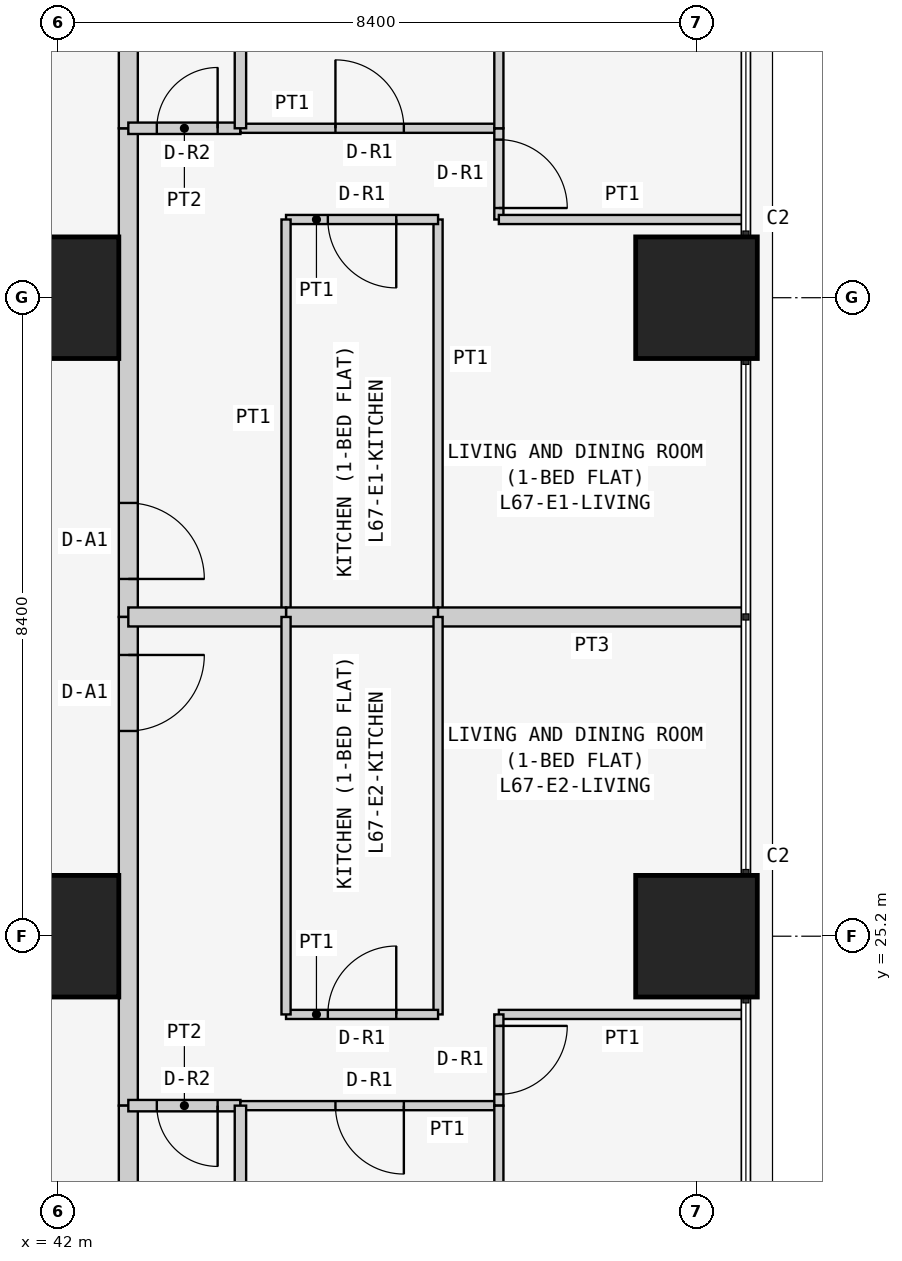
"""IFC4 building model, lengths in metres.
Left out: names, types, materials, properties, quantities, classifications, styles, units other than length and angle.
Written with IfcOpenShell. Run it as: python <this file> out.ifc"""

import sys

from ifc_helpers import new_model, si_unit, direction, frame, frame_2d, origin, origin_2d, place, context, subcontext, project, spatial, rectangle, extrude, element, fill, save


model = new_model("IFC4")
c1 = context("Model", 3, precision=1e-05, world=origin(), true_north=direction((0.0, 1.0)))
c2 = subcontext(c1, "Body", "Model", "MODEL_VIEW")
j1 = project(units=[si_unit("LENGTHUNIT", "METRE"), si_unit("PLANEANGLEUNIT", "RADIAN")], contexts=[c1])
p1 = place(None, origin())
s1 = spatial("IfcSite", under=j1, at=p1, CompositionType="ELEMENT")
p2 = place(p1, origin())
s2 = spatial("IfcBuilding", under=s1, at=p2, CompositionType="ELEMENT")
p3 = place(p2, frame((0.0, 0.0, 257.7)))
s3 = spatial("IfcBuildingStorey", under=s2, at=p3, CompositionType="ELEMENT", Elevation=257.7)
for number, where, z_axis, x_axis in (
    (1, (42.0, 25.2, 0.0), (0.0, 0.0, 1.0), (1.0, 0.0, 0.0)),
    (2, (42.0, 33.6, 0.0), (0.0, 0.0, 1.0), (1.0, 0.0, 0.0)),
    (3, (50.4, 25.2, 0.0), (0.0, 0.0, 1.0), (1.0, 0.0, 0.0)),
    (4, (50.4, 33.6, 0.0), (0.0, 0.0, 1.0), (1.0, 0.0, 0.0)),
):
    element("IfcColumn", number, at=place(p3, frame(where, z_axis=z_axis, x_axis=x_axis)), inside=s3, PredefinedType="COLUMN", context=c2, shape_type="SweptSolid", body=[
        extrude(rectangle(XDim=1.6, YDim=1.6, at=origin_2d()), origin(), (0.0, 0.0, 1.0), 3.6),
    ])
p4 = place(p3, frame((42.925, 35.829, 0.0), z_axis=(0.0, 0.0, 1.0), x_axis=(0.0, -1.0, 0.0)))
e5 = element("IfcWall", 5, at=p4, inside=s3, PredefinedType="PARTITIONING", context=c2, shape_type="SweptSolid", body=[
    extrude(rectangle(XDim=6.429, YDim=0.25, at=frame_2d((3.215, 0.0))), origin(), (0.0, 0.0, 1.0), 3.45),
])
p5 = place(p4, frame((4.929, 0.0, 0.0)))
e6 = element("IfcOpeningElement", 6, at=p5, cuts=e5, PredefinedType="OPENING", context=c2, shape_type="SweptSolid", body=[
    extrude(rectangle(XDim=1.0, YDim=2.1, at=frame_2d((0.5, 1.05))), frame((0.0, 0.135, 0.0), z_axis=(0.0, -1.0, 0.0), x_axis=(1.0, 0.0, 0.0)), (0.0, 0.0, 1.0), 0.27),
])
p6 = place(p3, frame((42.925, 42.7, 0.0), z_axis=(0.0, 0.0, 1.0), x_axis=(0.0, -1.0, 0.0)))
e7 = element("IfcWall", 7, at=p6, inside=s3, PredefinedType="PARTITIONING", context=c2, shape_type="SweptSolid", body=[
    extrude(rectangle(XDim=6.871, YDim=0.25, at=frame_2d((3.436, 0.0))), origin(), (0.0, 0.0, 1.0), 3.45),
])
p7 = place(p3, frame((42.925, 29.4, 0.0), z_axis=(0.0, 0.0, 1.0), x_axis=(0.0, -1.0, 0.0)))
e8 = element("IfcWall", 8, at=p7, inside=s3, PredefinedType="PARTITIONING", context=c2, shape_type="SweptSolid", body=[
    extrude(rectangle(XDim=6.429, YDim=0.25, at=frame_2d((3.214, 0.0))), origin(), (0.0, 0.0, 1.0), 3.45),
])
p8 = place(p7, frame((0.5, 0.0, 0.0)))
e9 = element("IfcOpeningElement", 9, at=p8, cuts=e8, PredefinedType="OPENING", context=c2, shape_type="SweptSolid", body=[
    extrude(rectangle(XDim=1.0, YDim=2.1, at=frame_2d((0.5, 1.05))), frame((0.0, 0.135, 0.0), z_axis=(0.0, -1.0, 0.0), x_axis=(1.0, 0.0, 0.0)), (0.0, 0.0, 1.0), 0.27),
])
p9 = place(p3, frame((42.925, 22.971, 0.0), z_axis=(0.0, 0.0, 1.0), x_axis=(0.0, -1.0, 0.0)))
e10 = element("IfcWall", 10, at=p9, inside=s3, PredefinedType="PARTITIONING", context=c2, shape_type="SweptSolid", body=[
    extrude(rectangle(XDim=6.871, YDim=0.25, at=frame_2d((3.436, 0.0))), origin(), (0.0, 0.0, 1.0), 3.45),
])
p10 = place(p3, frame((47.0, 29.4, 0.0), z_axis=(0.0, 0.0, 1.0), x_axis=(0.0, 1.0, 0.0)))
e11 = element("IfcWall", 11, at=p10, inside=s3, PredefinedType="PARTITIONING", context=c2, shape_type="SweptSolid", body=[
    extrude(rectangle(XDim=5.229, YDim=0.12, at=frame_2d((2.615, 0.0))), origin(), (0.0, 0.0, 1.0), 3.45),
])
p11 = place(p3, frame((47.0, 34.629, 0.0), z_axis=(0.0, 0.0, 1.0), x_axis=(-1.0, 0.0, 0.0)))
e12 = element("IfcWall", 12, at=p11, inside=s3, PredefinedType="PARTITIONING", context=c2, shape_type="SweptSolid", body=[
    extrude(rectangle(XDim=2.0, YDim=0.12, at=frame_2d((1.0, 0.0))), origin(), (0.0, 0.0, 1.0), 3.45),
])
p12 = place(p11, frame((0.55, 0.0, 0.0)))
e13 = element("IfcOpeningElement", 13, at=p12, cuts=e12, PredefinedType="OPENING", context=c2, shape_type="SweptSolid", body=[
    extrude(rectangle(XDim=0.9, YDim=2.1, at=frame_2d((0.45, 1.05))), frame((0.0, 0.07, 0.0), z_axis=(0.0, -1.0, 0.0), x_axis=(1.0, 0.0, 0.0)), (0.0, 0.0, 1.0), 0.14),
])
p13 = place(p3, frame((45.0, 34.629, 0.0), z_axis=(0.0, 0.0, 1.0), x_axis=(0.0, -1.0, 0.0)))
e14 = element("IfcWall", 14, at=p13, inside=s3, PredefinedType="PARTITIONING", context=c2, shape_type="SweptSolid", body=[
    extrude(rectangle(XDim=5.229, YDim=0.12, at=frame_2d((2.615, 0.0))), origin(), (0.0, 0.0, 1.0), 3.45),
])
p14 = place(p3, frame((45.0, 29.4, 0.0), z_axis=(0.0, 0.0, 1.0), x_axis=(1.0, 0.0, 0.0)))
e15 = element("IfcWall", 15, at=p14, inside=s3, PredefinedType="PARTITIONING", context=c2, shape_type="SweptSolid", body=[
    extrude(rectangle(XDim=2.0, YDim=0.25, at=frame_2d((1.0, 0.0))), origin(), (0.0, 0.0, 1.0), 3.45),
])
p15 = place(p3, frame((42.925, 35.829, 0.0), z_axis=(0.0, 0.0, 1.0), x_axis=(1.0, 0.0, 0.0)))
e16 = element("IfcWall", 16, at=p15, inside=s3, PredefinedType="PARTITIONING", context=c2, shape_type="SweptSolid", body=[
    extrude(rectangle(XDim=1.475, YDim=0.15, at=frame_2d((0.737, 0.0))), origin(), (0.0, 0.0, 1.0), 3.45),
])
p16 = place(p15, frame((0.375, 0.0, 0.0)))
e17 = element("IfcOpeningElement", 17, at=p16, cuts=e16, PredefinedType="OPENING", context=c2, shape_type="SweptSolid", body=[
    extrude(rectangle(XDim=0.8, YDim=2.1, at=frame_2d((0.4, 1.05))), frame((0.0, 0.085, 0.0), z_axis=(0.0, -1.0, 0.0), x_axis=(1.0, 0.0, 0.0)), (0.0, 0.0, 1.0), 0.17),
])
p17 = place(p3, frame((44.4, 35.829, 0.0), z_axis=(0.0, 0.0, 1.0), x_axis=(1.0, 0.0, 0.0)))
e18 = element("IfcWall", 18, at=p17, inside=s3, PredefinedType="PARTITIONING", context=c2, shape_type="SweptSolid", body=[
    extrude(rectangle(XDim=3.4, YDim=0.12, at=frame_2d((1.7, 0.0))), origin(), (0.0, 0.0, 1.0), 3.45),
])
p18 = place(p17, frame((1.25, 0.0, 0.0)))
e19 = element("IfcOpeningElement", 19, at=p18, cuts=e18, PredefinedType="OPENING", context=c2, shape_type="SweptSolid", body=[
    extrude(rectangle(XDim=0.9, YDim=2.1, at=frame_2d((0.45, 1.05))), frame((0.0, 0.07, 0.0), z_axis=(0.0, -1.0, 0.0), x_axis=(1.0, 0.0, 0.0)), (0.0, 0.0, 1.0), 0.14),
])
p19 = place(p3, frame((47.8, 35.829, 0.0), z_axis=(0.0, 0.0, 1.0), x_axis=(0.0, -1.0, 0.0)))
e20 = element("IfcWall", 20, at=p19, inside=s3, PredefinedType="PARTITIONING", context=c2, shape_type="SweptSolid", body=[
    extrude(rectangle(XDim=1.2, YDim=0.12, at=frame_2d((0.6, 0.0))), origin(), (0.0, 0.0, 1.0), 3.45),
])
p20 = place(p19, frame((0.149, 0.0, 0.0)))
e21 = element("IfcOpeningElement", 21, at=p20, cuts=e20, PredefinedType="OPENING", context=c2, shape_type="SweptSolid", body=[
    extrude(rectangle(XDim=0.9, YDim=2.1, at=frame_2d((0.45, 1.05))), frame((0.0, 0.07, 0.0), z_axis=(0.0, -1.0, 0.0), x_axis=(1.0, 0.0, 0.0)), (0.0, 0.0, 1.0), 0.14),
])
p21 = place(p3, frame((47.8, 34.629, 0.0), z_axis=(0.0, 0.0, 1.0), x_axis=(1.0, 0.0, 0.0)))
e22 = element("IfcWall", 22, at=p21, inside=s3, PredefinedType="PARTITIONING", context=c2, shape_type="SweptSolid", body=[
    extrude(rectangle(XDim=3.25, YDim=0.12, at=frame_2d((1.625, 0.0))), origin(), (0.0, 0.0, 1.0), 3.45),
])
p22 = place(p3, frame((45.0, 29.4, 0.0), z_axis=(0.0, 0.0, 1.0), x_axis=(-1.0, 0.0, 0.0)))
e23 = element("IfcWall", 23, at=p22, inside=s3, PredefinedType="PARTITIONING", context=c2, shape_type="SweptSolid", body=[
    extrude(rectangle(XDim=2.075, YDim=0.25, at=frame_2d((1.038, 0.0))), origin(), (0.0, 0.0, 1.0), 3.45),
])
p23 = place(p3, frame((51.05, 29.4, 0.0), z_axis=(0.0, 0.0, 1.0), x_axis=(-1.0, 0.0, 0.0)))
e24 = element("IfcWall", 24, at=p23, inside=s3, PredefinedType="PARTITIONING", context=c2, shape_type="SweptSolid", body=[
    extrude(rectangle(XDim=4.05, YDim=0.25, at=frame_2d((2.025, 0.0))), origin(), (0.0, 0.0, 1.0), 3.45),
])
p24 = place(p3, frame((44.4, 35.829, 0.0), z_axis=(0.0, 0.0, 1.0), x_axis=(0.0, 1.0, 0.0)))
e25 = element("IfcWall", 25, at=p24, inside=s3, PredefinedType="PARTITIONING", context=c2, shape_type="SweptSolid", body=[
    extrude(rectangle(XDim=6.871, YDim=0.15, at=frame_2d((3.436, 0.0))), origin(), (0.0, 0.0, 1.0), 3.45),
])
p25 = place(p3, frame((47.8, 35.829, 0.0), z_axis=(0.0, 0.0, 1.0), x_axis=(0.0, 1.0, 0.0)))
e26 = element("IfcWall", 26, at=p25, inside=s3, PredefinedType="PARTITIONING", context=c2, shape_type="SweptSolid", body=[
    extrude(rectangle(XDim=6.871, YDim=0.12, at=frame_2d((3.436, 0.0))), origin(), (0.0, 0.0, 1.0), 3.45),
])
p26 = place(p3, frame((47.0, 29.4, 0.0), z_axis=(0.0, 0.0, 1.0), x_axis=(0.0, -1.0, 0.0)))
e27 = element("IfcWall", 27, at=p26, inside=s3, PredefinedType="PARTITIONING", context=c2, shape_type="SweptSolid", body=[
    extrude(rectangle(XDim=5.229, YDim=0.12, at=frame_2d((2.615, 0.0))), origin(), (0.0, 0.0, 1.0), 3.45),
])
p27 = place(p3, frame((47.0, 24.171, 0.0), z_axis=(0.0, 0.0, 1.0), x_axis=(-1.0, 0.0, 0.0)))
e28 = element("IfcWall", 28, at=p27, inside=s3, PredefinedType="PARTITIONING", context=c2, shape_type="SweptSolid", body=[
    extrude(rectangle(XDim=2.0, YDim=0.12, at=frame_2d((1.0, 0.0))), origin(), (0.0, 0.0, 1.0), 3.45),
])
p28 = place(p27, frame((0.55, 0.0, 0.0)))
e29 = element("IfcOpeningElement", 29, at=p28, cuts=e28, PredefinedType="OPENING", context=c2, shape_type="SweptSolid", body=[
    extrude(rectangle(XDim=0.9, YDim=2.1, at=frame_2d((0.45, 1.05))), frame((0.0, 0.07, 0.0), z_axis=(0.0, -1.0, 0.0), x_axis=(1.0, 0.0, 0.0)), (0.0, 0.0, 1.0), 0.14),
])
p29 = place(p3, frame((45.0, 24.171, 0.0), z_axis=(0.0, 0.0, 1.0), x_axis=(0.0, 1.0, 0.0)))
e30 = element("IfcWall", 30, at=p29, inside=s3, PredefinedType="PARTITIONING", context=c2, shape_type="SweptSolid", body=[
    extrude(rectangle(XDim=5.229, YDim=0.12, at=frame_2d((2.615, 0.0))), origin(), (0.0, 0.0, 1.0), 3.45),
])
p30 = place(p3, frame((44.4, 22.971, 0.0), z_axis=(0.0, 0.0, 1.0), x_axis=(-1.0, 0.0, 0.0)))
e31 = element("IfcWall", 31, at=p30, inside=s3, PredefinedType="PARTITIONING", context=c2, shape_type="SweptSolid", body=[
    extrude(rectangle(XDim=1.475, YDim=0.15, at=frame_2d((0.737, 0.0))), origin(), (0.0, 0.0, 1.0), 3.45),
])
p31 = place(p30, frame((0.3, 0.0, 0.0)))
e32 = element("IfcOpeningElement", 32, at=p31, cuts=e31, PredefinedType="OPENING", context=c2, shape_type="SweptSolid", body=[
    extrude(rectangle(XDim=0.8, YDim=2.1, at=frame_2d((0.4, 1.05))), frame((0.0, 0.085, 0.0), z_axis=(0.0, -1.0, 0.0), x_axis=(1.0, 0.0, 0.0)), (0.0, 0.0, 1.0), 0.17),
])
p32 = place(p3, frame((47.8, 22.971, 0.0), z_axis=(0.0, 0.0, 1.0), x_axis=(-1.0, 0.0, 0.0)))
e33 = element("IfcWall", 33, at=p32, inside=s3, PredefinedType="PARTITIONING", context=c2, shape_type="SweptSolid", body=[
    extrude(rectangle(XDim=3.4, YDim=0.12, at=frame_2d((1.7, 0.0))), origin(), (0.0, 0.0, 1.0), 3.45),
])
p33 = place(p32, frame((1.25, 0.0, 0.0)))
e34 = element("IfcOpeningElement", 34, at=p33, cuts=e33, PredefinedType="OPENING", context=c2, shape_type="SweptSolid", body=[
    extrude(rectangle(XDim=0.9, YDim=2.1, at=frame_2d((0.45, 1.05))), frame((0.0, 0.07, 0.0), z_axis=(0.0, -1.0, 0.0), x_axis=(1.0, 0.0, 0.0)), (0.0, 0.0, 1.0), 0.14),
])
p34 = place(p3, frame((51.05, 24.171, 0.0), z_axis=(0.0, 0.0, 1.0), x_axis=(-1.0, 0.0, 0.0)))
e35 = element("IfcWall", 35, at=p34, inside=s3, PredefinedType="PARTITIONING", context=c2, shape_type="SweptSolid", body=[
    extrude(rectangle(XDim=3.25, YDim=0.12, at=frame_2d((1.625, 0.0))), origin(), (0.0, 0.0, 1.0), 3.45),
])
p35 = place(p3, frame((47.8, 24.171, 0.0), z_axis=(0.0, 0.0, 1.0), x_axis=(0.0, -1.0, 0.0)))
e36 = element("IfcWall", 36, at=p35, inside=s3, PredefinedType="PARTITIONING", context=c2, shape_type="SweptSolid", body=[
    extrude(rectangle(XDim=1.2, YDim=0.12, at=frame_2d((0.6, 0.0))), origin(), (0.0, 0.0, 1.0), 3.45),
])
p36 = place(p35, frame((0.151, 0.0, 0.0)))
e37 = element("IfcOpeningElement", 37, at=p36, cuts=e36, PredefinedType="OPENING", context=c2, shape_type="SweptSolid", body=[
    extrude(rectangle(XDim=0.9, YDim=2.1, at=frame_2d((0.45, 1.05))), frame((0.0, 0.07, 0.0), z_axis=(0.0, -1.0, 0.0), x_axis=(1.0, 0.0, 0.0)), (0.0, 0.0, 1.0), 0.14),
])
p37 = place(p3, frame((44.4, 22.971, 0.0), z_axis=(0.0, 0.0, 1.0), x_axis=(0.0, -1.0, 0.0)))
e38 = element("IfcWall", 38, at=p37, inside=s3, PredefinedType="PARTITIONING", context=c2, shape_type="SweptSolid", body=[
    extrude(rectangle(XDim=6.871, YDim=0.15, at=frame_2d((3.436, 0.0))), origin(), (0.0, 0.0, 1.0), 3.45),
])
p38 = place(p3, frame((47.8, 22.971, 0.0), z_axis=(0.0, 0.0, 1.0), x_axis=(0.0, -1.0, 0.0)))
e39 = element("IfcWall", 39, at=p38, inside=s3, PredefinedType="PARTITIONING", context=c2, shape_type="SweptSolid", body=[
    extrude(rectangle(XDim=6.871, YDim=0.12, at=frame_2d((3.436, 0.0))), origin(), (0.0, 0.0, 1.0), 3.45),
])
p39 = place(p5, origin())
e40 = element("IfcDoor", 40, at=p39, inside=s3, OperationType="SINGLE_SWING_RIGHT", PredefinedType="DOOR", context=c2, shape_type="SweptSolid", body=[
    extrude(rectangle(XDim=1.0, YDim=2.1, at=frame_2d((0.5, 1.05))), frame((0.0, 0.025, 0.0), z_axis=(0.0, -1.0, 0.0), x_axis=(1.0, 0.0, 0.0)), (0.0, 0.0, 1.0), 0.05),
])
fill(e6, e40)
p40 = place(p12, origin())
e41 = element("IfcDoor", 41, at=p40, inside=s3, OperationType="SINGLE_SWING_LEFT", PredefinedType="DOOR", context=c2, shape_type="SweptSolid", body=[
    extrude(rectangle(XDim=0.9, YDim=2.1, at=frame_2d((0.45, 1.05))), frame((0.0, 0.025, 0.0), z_axis=(0.0, -1.0, 0.0), x_axis=(1.0, 0.0, 0.0)), (0.0, 0.0, 1.0), 0.05),
])
fill(e13, e41)
p41 = place(p16, origin())
e42 = element("IfcDoor", 42, at=p41, inside=s3, OperationType="SINGLE_SWING_RIGHT", PredefinedType="DOOR", context=c2, shape_type="SweptSolid", body=[
    extrude(rectangle(XDim=0.8, YDim=2.1, at=frame_2d((0.4, 1.05))), frame((0.0, 0.025, 0.0), z_axis=(0.0, -1.0, 0.0), x_axis=(1.0, 0.0, 0.0)), (0.0, 0.0, 1.0), 0.05),
])
fill(e17, e42)
p42 = place(p18, origin())
e43 = element("IfcDoor", 43, at=p42, inside=s3, OperationType="SINGLE_SWING_LEFT", PredefinedType="DOOR", context=c2, shape_type="SweptSolid", body=[
    extrude(rectangle(XDim=0.9, YDim=2.1, at=frame_2d((0.45, 1.05))), frame((0.0, 0.025, 0.0), z_axis=(0.0, -1.0, 0.0), x_axis=(1.0, 0.0, 0.0)), (0.0, 0.0, 1.0), 0.05),
])
fill(e19, e43)
p43 = place(p20, origin())
e44 = element("IfcDoor", 44, at=p43, inside=s3, OperationType="SINGLE_SWING_RIGHT", PredefinedType="DOOR", context=c2, shape_type="SweptSolid", body=[
    extrude(rectangle(XDim=0.9, YDim=2.1, at=frame_2d((0.45, 1.05))), frame((0.0, 0.025, 0.0), z_axis=(0.0, -1.0, 0.0), x_axis=(1.0, 0.0, 0.0)), (0.0, 0.0, 1.0), 0.05),
])
fill(e21, e44)
p44 = place(p8, origin())
e45 = element("IfcDoor", 45, at=p44, inside=s3, OperationType="SINGLE_SWING_LEFT", PredefinedType="DOOR", context=c2, shape_type="SweptSolid", body=[
    extrude(rectangle(XDim=1.0, YDim=2.1, at=frame_2d((0.5, 1.05))), frame((0.0, 0.025, 0.0), z_axis=(0.0, -1.0, 0.0), x_axis=(1.0, 0.0, 0.0)), (0.0, 0.0, 1.0), 0.05),
])
fill(e9, e45)
p45 = place(p28, frame((0.9, 0.0, 0.0), z_axis=(0.0, 0.0, 1.0), x_axis=(-1.0, 0.0, 0.0)))
e46 = element("IfcDoor", 46, at=p45, inside=s3, OperationType="SINGLE_SWING_RIGHT", PredefinedType="DOOR", context=c2, shape_type="SweptSolid", body=[
    extrude(rectangle(XDim=0.9, YDim=2.1, at=frame_2d((0.45, 1.05))), frame((0.0, 0.025, 0.0), z_axis=(0.0, -1.0, 0.0), x_axis=(1.0, 0.0, 0.0)), (0.0, 0.0, 1.0), 0.05),
])
fill(e29, e46)
p46 = place(p31, origin())
e47 = element("IfcDoor", 47, at=p46, inside=s3, OperationType="SINGLE_SWING_LEFT", PredefinedType="DOOR", context=c2, shape_type="SweptSolid", body=[
    extrude(rectangle(XDim=0.8, YDim=2.1, at=frame_2d((0.4, 1.05))), frame((0.0, 0.025, 0.0), z_axis=(0.0, -1.0, 0.0), x_axis=(1.0, 0.0, 0.0)), (0.0, 0.0, 1.0), 0.05),
])
fill(e32, e47)
p47 = place(p33, origin())
e48 = element("IfcDoor", 48, at=p47, inside=s3, OperationType="SINGLE_SWING_LEFT", PredefinedType="DOOR", context=c2, shape_type="SweptSolid", body=[
    extrude(rectangle(XDim=0.9, YDim=2.1, at=frame_2d((0.45, 1.05))), frame((0.0, 0.025, 0.0), z_axis=(0.0, -1.0, 0.0), x_axis=(1.0, 0.0, 0.0)), (0.0, 0.0, 1.0), 0.05),
])
fill(e34, e48)
p48 = place(p36, origin())
e49 = element("IfcDoor", 49, at=p48, inside=s3, OperationType="SINGLE_SWING_LEFT", PredefinedType="DOOR", context=c2, shape_type="SweptSolid", body=[
    extrude(rectangle(XDim=0.9, YDim=2.1, at=frame_2d((0.45, 1.05))), frame((0.0, 0.025, 0.0), z_axis=(0.0, -1.0, 0.0), x_axis=(1.0, 0.0, 0.0)), (0.0, 0.0, 1.0), 0.05),
])
fill(e37, e49)
save(model, sys.argv[1])
